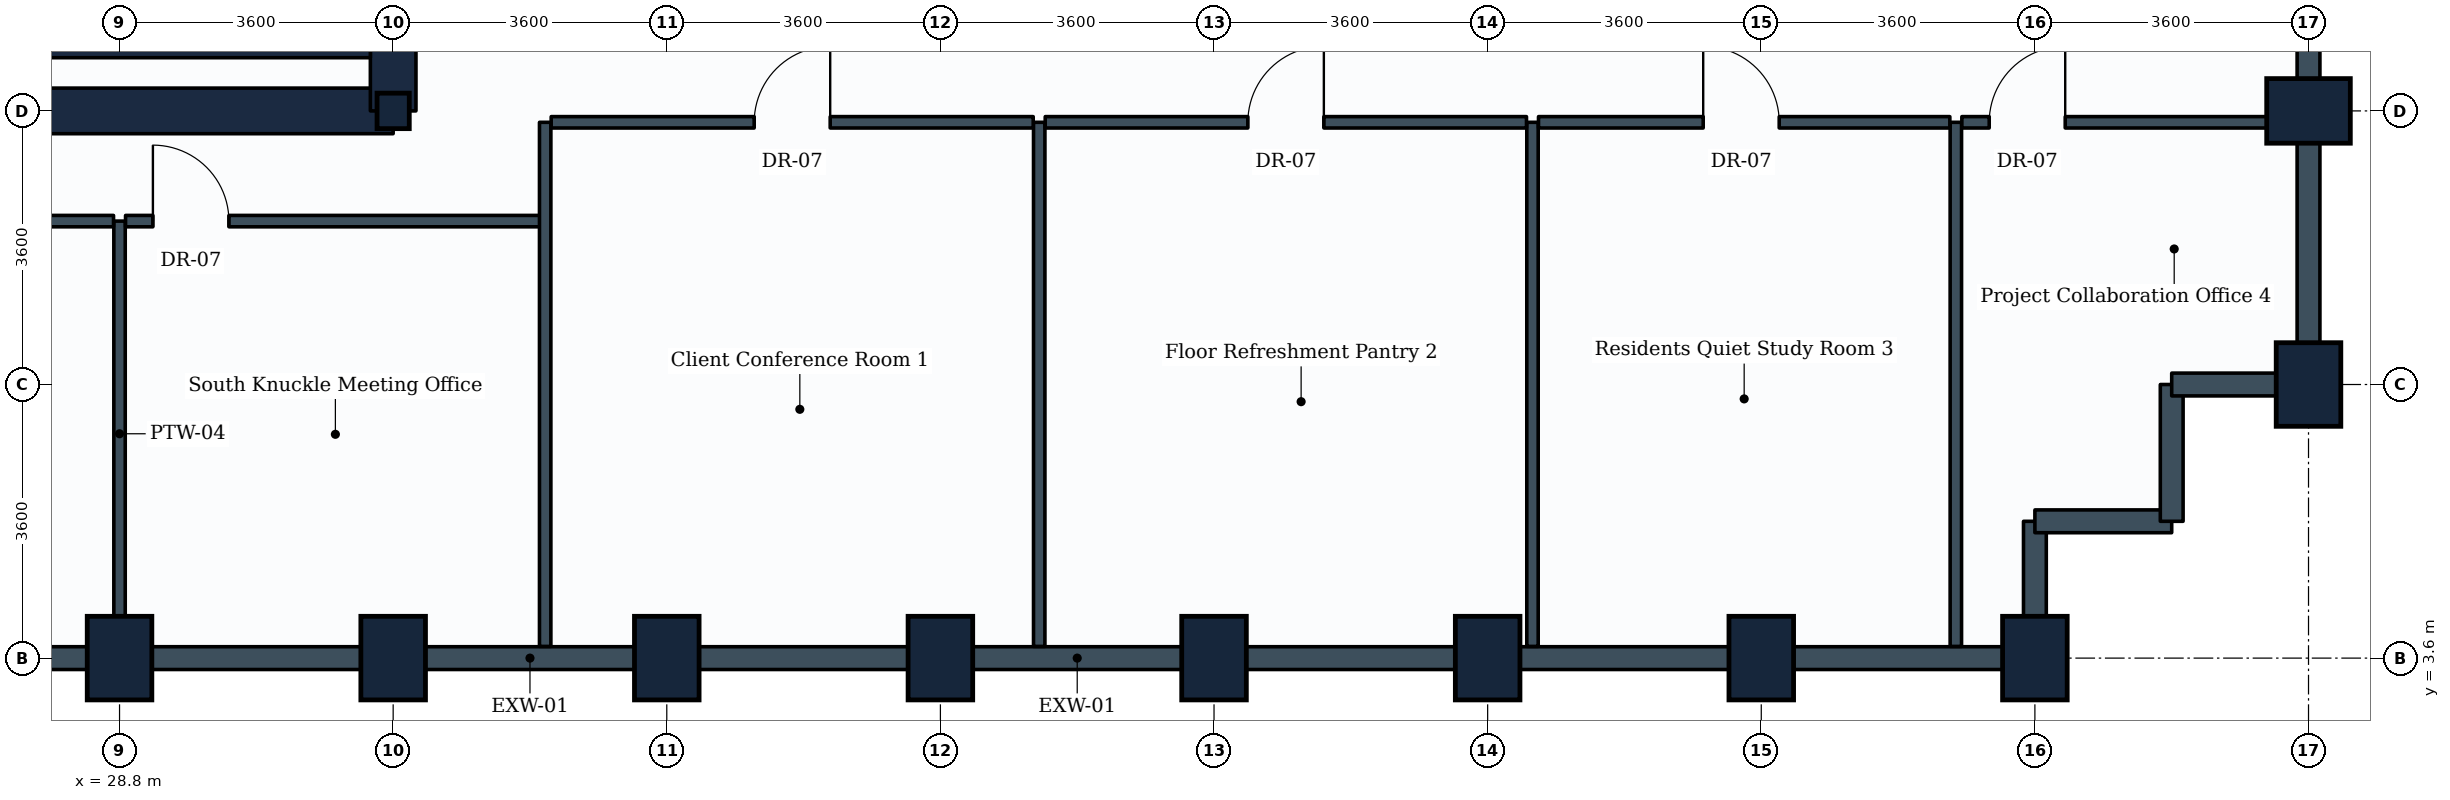
"""IFC4 building model, lengths in metres.
Left out: names, types, materials, properties, quantities, classifications, styles, units other than length and angle.
Written with IfcOpenShell. Run it as: python <this file> out.ifc"""

import sys

from ifc_helpers import new_model, si_unit, direction, frame, frame_2d, origin, origin_2d, place, context, subcontext, project, spatial, rectangle, i_section, extrude, element, fill, save


model = new_model("IFC4")
c1 = context("Model", 3, precision=1e-05, world=origin(), true_north=direction((0.0, 1.0)))
c2 = subcontext(c1, "Body", "Model", "MODEL_VIEW")
j1 = project(units=[si_unit("LENGTHUNIT", "METRE"), si_unit("PLANEANGLEUNIT", "RADIAN")], contexts=[c1])
p1 = place(None, origin())
s1 = spatial("IfcSite", under=j1, at=p1, CompositionType="ELEMENT")
p2 = place(p1, origin())
s2 = spatial("IfcBuilding", under=s1, at=p2, CompositionType="ELEMENT")
p3 = place(p2, frame((0.0, 0.0, 91.8)))
s3 = spatial("IfcBuildingStorey", under=s2, at=p3, CompositionType="ELEMENT", Elevation=91.8)
for number, where, z_axis, x_axis in (
    (1, (28.8, 3.6, 0.0), (0.0, 0.0, 1.0), (1.0, 0.0, 0.0)),
    (2, (32.4, 3.6, 0.0), (0.0, 0.0, 1.0), (1.0, 0.0, 0.0)),
):
    element("IfcColumn", number, at=place(p3, frame(where, z_axis=z_axis, x_axis=x_axis)), inside=s3, PredefinedType="COLUMN", context=c2, shape_type="SweptSolid", body=[
        extrude(rectangle(XDim=0.85, YDim=1.1, at=origin_2d()), origin(), (0.0, 0.0, 1.0), 3.9),
    ])
p4 = place(p3, frame((32.4, 10.8, 0.0), z_axis=(0.0, 0.0, 1.0), x_axis=(1.0, 0.0, 0.0)))
e3 = element("IfcColumn", 3, at=p4, inside=s3, PredefinedType="COLUMN", context=c2, shape_type="SweptSolid", body=[
    extrude(i_section(OverallWidth=0.424, OverallDepth=0.467, WebThickness=0.033, FlangeThickness=0.053, FilletRadius=0.015, at=origin_2d()), origin(), (0.0, 0.0, 1.0), 3.9),
])
for number, where, z_axis, x_axis in (
    (4, (36.0, 3.6, 0.0), (0.0, 0.0, 1.0), (1.0, 0.0, 0.0)),
    (5, (39.6, 3.6, 0.0), (0.0, 0.0, 1.0), (1.0, 0.0, 0.0)),
    (6, (43.2, 3.6, 0.0), (0.0, 0.0, 1.0), (1.0, 0.0, 0.0)),
    (7, (46.8, 3.6, 0.0), (0.0, 0.0, 1.0), (1.0, 0.0, 0.0)),
    (8, (50.4, 3.6, 0.0), (0.0, 0.0, 1.0), (1.0, 0.0, 0.0)),
    (9, (54.0, 3.6, 0.0), (0.0, 0.0, 1.0), (1.0, 0.0, 0.0)),
    (10, (57.6, 7.2, 0.0), (0.0, 0.0, 1.0), (1.0, 0.0, 0.0)),
    (11, (57.6, 10.8, 0.0), (0.0, 0.0, 1.0), (0.0, 1.0, 0.0)),
):
    element("IfcColumn", number, at=place(p3, frame(where, z_axis=z_axis, x_axis=x_axis)), inside=s3, PredefinedType="COLUMN", context=c2, shape_type="SweptSolid", body=[
        extrude(rectangle(XDim=0.85, YDim=1.1, at=origin_2d()), origin(), (0.0, 0.0, 1.0), 3.9),
    ])
p5 = place(p3, frame((28.8, 3.6, 0.0), z_axis=(0.0, 0.0, 1.0), x_axis=(-1.0, 0.0, 0.0)))
e12 = element("IfcWall", 12, at=p5, inside=s3, PredefinedType="STANDARD", context=c2, shape_type="SweptSolid", body=[
    extrude(rectangle(XDim=3.6, YDim=0.3, at=frame_2d((1.8, 0.0))), origin(), (0.0, 0.0, 1.0), 2.93),
])
p6 = place(p3, frame((32.4, 3.6, 0.0), z_axis=(0.0, 0.0, 1.0), x_axis=(-1.0, 0.0, 0.0)))
e13 = element("IfcWall", 13, at=p6, inside=s3, PredefinedType="STANDARD", context=c2, shape_type="SweptSolid", body=[
    extrude(rectangle(XDim=3.6, YDim=0.3, at=frame_2d((1.8, 0.0))), origin(), (0.0, 0.0, 1.0), 2.93),
])
for number, where, z_axis, x_axis in (
    (14, (36.0, 3.6, 0.0), (0.0, 0.0, 1.0), (-1.0, 0.0, 0.0)),
    (15, (39.6, 3.6, 0.0), (0.0, 0.0, 1.0), (-1.0, 0.0, 0.0)),
):
    element("IfcWall", number, at=place(p3, frame(where, z_axis=z_axis, x_axis=x_axis)), inside=s3, PredefinedType="STANDARD", context=c2, shape_type="SweptSolid", body=[
        extrude(rectangle(XDim=3.6, YDim=0.3, at=frame_2d((1.8, 0.0))), origin(), (0.0, 0.0, 1.0), 2.93),
    ])
p7 = place(p3, frame((43.2, 3.6, 0.0), z_axis=(0.0, 0.0, 1.0), x_axis=(-1.0, 0.0, 0.0)))
e16 = element("IfcWall", 16, at=p7, inside=s3, PredefinedType="STANDARD", context=c2, shape_type="SweptSolid", body=[
    extrude(rectangle(XDim=3.6, YDim=0.3, at=frame_2d((1.8, 0.0))), origin(), (0.0, 0.0, 1.0), 2.93),
])
p8 = place(p3, frame((46.8, 3.6, 0.0), z_axis=(0.0, 0.0, 1.0), x_axis=(-1.0, 0.0, 0.0)))
e17 = element("IfcWall", 17, at=p8, inside=s3, PredefinedType="STANDARD", context=c2, shape_type="SweptSolid", body=[
    extrude(rectangle(XDim=3.6, YDim=0.3, at=frame_2d((1.8, 0.0))), origin(), (0.0, 0.0, 1.0), 2.93),
])
p9 = place(p3, frame((50.4, 3.6, 0.0), z_axis=(0.0, 0.0, 1.0), x_axis=(-1.0, 0.0, 0.0)))
e18 = element("IfcWall", 18, at=p9, inside=s3, PredefinedType="STANDARD", context=c2, shape_type="SweptSolid", body=[
    extrude(rectangle(XDim=3.6, YDim=0.3, at=frame_2d((1.8, 0.0))), origin(), (0.0, 0.0, 1.0), 2.93),
])
p10 = place(p3, frame((54.0, 3.6, 0.0), z_axis=(0.0, 0.0, 1.0), x_axis=(-1.0, 0.0, 0.0)))
e19 = element("IfcWall", 19, at=p10, inside=s3, PredefinedType="STANDARD", context=c2, shape_type="SweptSolid", body=[
    extrude(rectangle(XDim=3.6, YDim=0.3, at=frame_2d((1.8, 0.0))), origin(), (0.0, 0.0, 1.0), 2.93),
])
p11 = place(p3, frame((54.0, 5.4, 0.0), z_axis=(0.0, 0.0, 1.0), x_axis=(0.0, -1.0, 0.0)))
e20 = element("IfcWall", 20, at=p11, inside=s3, PredefinedType="STANDARD", context=c2, shape_type="SweptSolid", body=[
    extrude(rectangle(XDim=1.8, YDim=0.3, at=frame_2d((0.9, 0.0))), origin(), (0.0, 0.0, 1.0), 2.93),
])
for number, where, z_axis, x_axis in (
    (21, (55.8, 5.4, 0.0), (0.0, 0.0, 1.0), (-1.0, 0.0, 0.0)),
    (22, (55.8, 7.2, 0.0), (0.0, 0.0, 1.0), (0.0, -1.0, 0.0)),
):
    element("IfcWall", number, at=place(p3, frame(where, z_axis=z_axis, x_axis=x_axis)), inside=s3, PredefinedType="STANDARD", context=c2, shape_type="SweptSolid", body=[
        extrude(rectangle(XDim=1.8, YDim=0.3, at=frame_2d((0.9, 0.0))), origin(), (0.0, 0.0, 1.0), 3.635),
    ])
p12 = place(p3, frame((57.6, 7.2, 0.0), z_axis=(0.0, 0.0, 1.0), x_axis=(-1.0, 0.0, 0.0)))
e23 = element("IfcWall", 23, at=p12, inside=s3, PredefinedType="STANDARD", context=c2, shape_type="SweptSolid", body=[
    extrude(rectangle(XDim=1.8, YDim=0.3, at=frame_2d((0.9, 0.0))), origin(), (0.0, 0.0, 1.0), 2.93),
])
p13 = place(p3, frame((57.6, 10.8, 0.0), z_axis=(0.0, 0.0, 1.0), x_axis=(0.0, -1.0, 0.0)))
e24 = element("IfcWall", 24, at=p13, inside=s3, PredefinedType="STANDARD", context=c2, shape_type="SweptSolid", body=[
    extrude(rectangle(XDim=3.6, YDim=0.3, at=frame_2d((1.8, 0.0))), origin(), (0.0, 0.0, 1.0), 2.93),
])
p14 = place(p3, frame((57.6, 14.4, 0.0), z_axis=(0.0, 0.0, 1.0), x_axis=(0.0, -1.0, 0.0)))
e25 = element("IfcWall", 25, at=p14, inside=s3, PredefinedType="STANDARD", context=c2, shape_type="SweptSolid", body=[
    extrude(rectangle(XDim=3.6, YDim=0.3, at=frame_2d((1.8, 0.0))), origin(), (0.0, 0.0, 1.0), 2.93),
])
p15 = place(p3, frame((14.4, 10.8, 0.0), z_axis=(0.0, 0.0, 1.0), x_axis=(1.0, 0.0, 0.0)))
e26 = element("IfcWall", 26, at=p15, inside=s3, PredefinedType="SHEAR", context=c2, shape_type="SweptSolid", body=[
    extrude(rectangle(XDim=18.0, YDim=0.6, at=frame_2d((9.0, 0.0))), origin(), (0.0, 0.0, 1.0), 3.65),
])
p16 = place(p3, frame((32.4, 10.8, 0.0), z_axis=(0.0, 0.0, 1.0), x_axis=(0.0, 1.0, 0.0)))
e27 = element("IfcWall", 27, at=p16, inside=s3, PredefinedType="SHEAR", context=c2, shape_type="SweptSolid", body=[
    extrude(rectangle(XDim=14.4, YDim=0.6, at=frame_2d((7.2, 0.0))), origin(), (0.0, 0.0, 1.0), 3.65),
])
p17 = place(p16, frame((4.35, 0.0, 0.0)))
e28 = element("IfcOpeningElement", 28, at=p17, cuts=e27, PredefinedType="OPENING", context=c2, shape_type="SweptSolid", body=[
    extrude(rectangle(XDim=1.2, YDim=2.1, at=frame_2d((0.6, 1.05))), frame((0.0, 0.31, 0.0), z_axis=(0.0, -1.0, 0.0), x_axis=(1.0, 0.0, 0.0)), (0.0, 0.0, 1.0), 0.62),
])
p18 = place(p16, frame((10.0, 0.0, 0.0)))
e29 = element("IfcOpeningElement", 29, at=p18, cuts=e27, PredefinedType="OPENING", context=c2, shape_type="SweptSolid", body=[
    extrude(rectangle(XDim=1.2, YDim=2.1, at=frame_2d((0.6, 1.05))), frame((0.0, 0.31, 0.0), z_axis=(0.0, -1.0, 0.0), x_axis=(1.0, 0.0, 0.0)), (0.0, 0.0, 1.0), 0.62),
])
p19 = place(p3, frame((23.35, 11.625, 0.0), z_axis=(0.0, 0.0, 1.0), x_axis=(1.0, 0.0, 0.0)))
e30 = element("IfcWall", 30, at=p19, inside=s3, PredefinedType="SHEAR", context=c2, shape_type="SweptSolid", body=[
    extrude(rectangle(XDim=8.75, YDim=0.25, at=frame_2d((4.375, 0.0))), origin(), (0.0, 0.0, 1.0), 3.65),
])
p20 = place(p3, frame((28.8, 9.35, 0.0), z_axis=(0.0, 0.0, 1.0), x_axis=(0.0, -1.0, 0.0)))
e31 = element("IfcWall", 31, at=p20, inside=s3, PredefinedType="PARTITIONING", context=c2, shape_type="SweptSolid", body=[
    extrude(rectangle(XDim=5.596, YDim=0.15, at=frame_2d((2.798, 0.0))), origin(), (0.0, 0.0, 1.0), 3.635),
])
p21 = place(p3, frame((20.479, 9.35, 0.0), z_axis=(0.0, 0.0, 1.0), x_axis=(1.0, 0.0, 0.0)))
e32 = element("IfcWall", 32, at=p21, inside=s3, PredefinedType="PARTITIONING", context=c2, shape_type="SweptSolid", body=[
    extrude(rectangle(XDim=8.242, YDim=0.15, at=frame_2d((4.121, 0.0))), origin(), (0.0, 0.0, 1.0), 3.18),
])
p22 = place(p21, frame((3.939, 0.0, 0.0)))
e33 = element("IfcOpeningElement", 33, at=p22, cuts=e32, PredefinedType="OPENING", context=c2, shape_type="SweptSolid", body=[
    extrude(rectangle(XDim=1.0, YDim=2.1, at=frame_2d((0.5, 1.05))), frame((0.0, 0.085, 0.0), z_axis=(0.0, -1.0, 0.0), x_axis=(1.0, 0.0, 0.0)), (0.0, 0.0, 1.0), 0.17),
])
p23 = place(p3, frame((28.879, 9.35, 0.0), z_axis=(0.0, 0.0, 1.0), x_axis=(1.0, 0.0, 0.0)))
e34 = element("IfcWall", 34, at=p23, inside=s3, PredefinedType="PARTITIONING", context=c2, shape_type="SweptSolid", body=[
    extrude(rectangle(XDim=5.521, YDim=0.15, at=frame_2d((2.76, 0.0))), origin(), (0.0, 0.0, 1.0), 3.635),
])
p24 = place(p23, frame((0.36, 0.0, 0.0)))
e35 = element("IfcOpeningElement", 35, at=p24, cuts=e34, PredefinedType="OPENING", context=c2, shape_type="SweptSolid", body=[
    extrude(rectangle(XDim=1.0, YDim=2.1, at=frame_2d((0.5, 1.05))), frame((0.0, 0.085, 0.0), z_axis=(0.0, -1.0, 0.0), x_axis=(1.0, 0.0, 0.0)), (0.0, 0.0, 1.0), 0.17),
])
for number, where, z_axis, x_axis in (
    (36, (34.4, 3.754, 0.0), (0.0, 0.0, 1.0), (0.0, 1.0, 0.0)),
    (37, (40.9, 3.754, 0.0), (0.0, 0.0, 1.0), (0.0, 1.0, 0.0)),
):
    element("IfcWall", number, at=place(p3, frame(where, z_axis=z_axis, x_axis=x_axis)), inside=s3, PredefinedType="PARTITIONING", context=c2, shape_type="SweptSolid", body=[
        extrude(rectangle(XDim=6.896, YDim=0.15, at=frame_2d((3.448, 0.0))), origin(), (0.0, 0.0, 1.0), 2.93),
    ])
p25 = place(p3, frame((34.479, 10.65, 0.0), z_axis=(0.0, 0.0, 1.0), x_axis=(1.0, 0.0, 0.0)))
e38 = element("IfcWall", 38, at=p25, inside=s3, PredefinedType="PARTITIONING", context=c2, shape_type="SweptSolid", body=[
    extrude(rectangle(XDim=6.342, YDim=0.15, at=frame_2d((3.171, 0.0))), origin(), (0.0, 0.0, 1.0), 3.18),
])
p26 = place(p25, frame((2.671, 0.0, 0.0)))
e39 = element("IfcOpeningElement", 39, at=p26, cuts=e38, PredefinedType="OPENING", context=c2, shape_type="SweptSolid", body=[
    extrude(rectangle(XDim=1.0, YDim=2.1, at=frame_2d((0.5, 1.05))), frame((0.0, 0.085, 0.0), z_axis=(0.0, -1.0, 0.0), x_axis=(1.0, 0.0, 0.0)), (0.0, 0.0, 1.0), 0.17),
])
p27 = place(p3, frame((47.39, 3.754, 0.0), z_axis=(0.0, 0.0, 1.0), x_axis=(0.0, 1.0, 0.0)))
e40 = element("IfcWall", 40, at=p27, inside=s3, PredefinedType="PARTITIONING", context=c2, shape_type="SweptSolid", body=[
    extrude(rectangle(XDim=6.896, YDim=0.15, at=frame_2d((3.448, 0.0))), origin(), (0.0, 0.0, 1.0), 2.93),
])
p28 = place(p3, frame((40.979, 10.65, 0.0), z_axis=(0.0, 0.0, 1.0), x_axis=(1.0, 0.0, 0.0)))
e41 = element("IfcWall", 41, at=p28, inside=s3, PredefinedType="PARTITIONING", context=c2, shape_type="SweptSolid", body=[
    extrude(rectangle(XDim=6.332, YDim=0.15, at=frame_2d((3.166, 0.0))), origin(), (0.0, 0.0, 1.0), 3.18),
])
p29 = place(p28, frame((2.666, 0.0, 0.0)))
e42 = element("IfcOpeningElement", 42, at=p29, cuts=e41, PredefinedType="OPENING", context=c2, shape_type="SweptSolid", body=[
    extrude(rectangle(XDim=1.0, YDim=2.1, at=frame_2d((0.5, 1.05))), frame((0.0, 0.085, 0.0), z_axis=(0.0, -1.0, 0.0), x_axis=(1.0, 0.0, 0.0)), (0.0, 0.0, 1.0), 0.17),
])
p30 = place(p3, frame((52.96, 3.754, 0.0), z_axis=(0.0, 0.0, 1.0), x_axis=(0.0, 1.0, 0.0)))
e43 = element("IfcWall", 43, at=p30, inside=s3, PredefinedType="PARTITIONING", context=c2, shape_type="SweptSolid", body=[
    extrude(rectangle(XDim=6.896, YDim=0.15, at=frame_2d((3.448, 0.0))), origin(), (0.0, 0.0, 1.0), 2.93),
])
p31 = place(p3, frame((47.469, 10.65, 0.0), z_axis=(0.0, 0.0, 1.0), x_axis=(1.0, 0.0, 0.0)))
e44 = element("IfcWall", 44, at=p31, inside=s3, PredefinedType="PARTITIONING", context=c2, shape_type="SweptSolid", body=[
    extrude(rectangle(XDim=5.412, YDim=0.15, at=frame_2d((2.706, 0.0))), origin(), (0.0, 0.0, 1.0), 3.23),
])
p32 = place(p31, frame((2.167, 0.0, 0.0)))
e45 = element("IfcOpeningElement", 45, at=p32, cuts=e44, PredefinedType="OPENING", context=c2, shape_type="SweptSolid", body=[
    extrude(rectangle(XDim=1.0, YDim=2.1, at=frame_2d((0.5, 1.05))), frame((0.0, 0.085, 0.0), z_axis=(0.0, -1.0, 0.0), x_axis=(1.0, 0.0, 0.0)), (0.0, 0.0, 1.0), 0.17),
])
p33 = place(p3, frame((53.039, 10.65, 0.0), z_axis=(0.0, 0.0, 1.0), x_axis=(1.0, 0.0, 0.0)))
e46 = element("IfcWall", 46, at=p33, inside=s3, PredefinedType="PARTITIONING", context=c2, shape_type="SweptSolid", body=[
    extrude(rectangle(XDim=4.407, YDim=0.15, at=frame_2d((2.204, 0.0))), origin(), (0.0, 0.0, 1.0), 2.93),
])
p34 = place(p33, frame((0.36, 0.0, 0.0)))
e47 = element("IfcOpeningElement", 47, at=p34, cuts=e46, PredefinedType="OPENING", context=c2, shape_type="SweptSolid", body=[
    extrude(rectangle(XDim=1.0, YDim=2.1, at=frame_2d((0.5, 1.05))), frame((0.0, 0.085, 0.0), z_axis=(0.0, -1.0, 0.0), x_axis=(1.0, 0.0, 0.0)), (0.0, 0.0, 1.0), 0.17),
])
p35 = place(p24, origin())
e48 = element("IfcDoor", 48, at=p35, inside=s3, OperationType="SINGLE_SWING_LEFT", PredefinedType="DOOR", context=c2, shape_type="SweptSolid", body=[
    extrude(rectangle(XDim=1.0, YDim=2.1, at=frame_2d((0.5, 1.05))), frame((0.0, 0.025, 0.0), z_axis=(0.0, -1.0, 0.0), x_axis=(1.0, 0.0, 0.0)), (0.0, 0.0, 1.0), 0.05),
])
fill(e35, e48)
p36 = place(p26, origin())
e49 = element("IfcDoor", 49, at=p36, inside=s3, OperationType="SINGLE_SWING_RIGHT", PredefinedType="DOOR", context=c2, shape_type="SweptSolid", body=[
    extrude(rectangle(XDim=1.0, YDim=2.1, at=frame_2d((0.5, 1.05))), frame((0.0, 0.025, 0.0), z_axis=(0.0, -1.0, 0.0), x_axis=(1.0, 0.0, 0.0)), (0.0, 0.0, 1.0), 0.05),
])
fill(e39, e49)
p37 = place(p29, origin())
e50 = element("IfcDoor", 50, at=p37, inside=s3, OperationType="SINGLE_SWING_RIGHT", PredefinedType="DOOR", context=c2, shape_type="SweptSolid", body=[
    extrude(rectangle(XDim=1.0, YDim=2.1, at=frame_2d((0.5, 1.05))), frame((0.0, 0.025, 0.0), z_axis=(0.0, -1.0, 0.0), x_axis=(1.0, 0.0, 0.0)), (0.0, 0.0, 1.0), 0.05),
])
fill(e42, e50)
p38 = place(p32, origin())
e51 = element("IfcDoor", 51, at=p38, inside=s3, OperationType="SINGLE_SWING_LEFT", PredefinedType="DOOR", context=c2, shape_type="SweptSolid", body=[
    extrude(rectangle(XDim=1.0, YDim=2.1, at=frame_2d((0.5, 1.05))), frame((0.0, 0.025, 0.0), z_axis=(0.0, -1.0, 0.0), x_axis=(1.0, 0.0, 0.0)), (0.0, 0.0, 1.0), 0.05),
])
fill(e45, e51)
p39 = place(p34, origin())
e52 = element("IfcDoor", 52, at=p39, inside=s3, OperationType="SINGLE_SWING_RIGHT", PredefinedType="DOOR", context=c2, shape_type="SweptSolid", body=[
    extrude(rectangle(XDim=1.0, YDim=2.1, at=frame_2d((0.5, 1.05))), frame((0.0, 0.025, 0.0), z_axis=(0.0, -1.0, 0.0), x_axis=(1.0, 0.0, 0.0)), (0.0, 0.0, 1.0), 0.05),
])
fill(e47, e52)
save(model, sys.argv[1])
